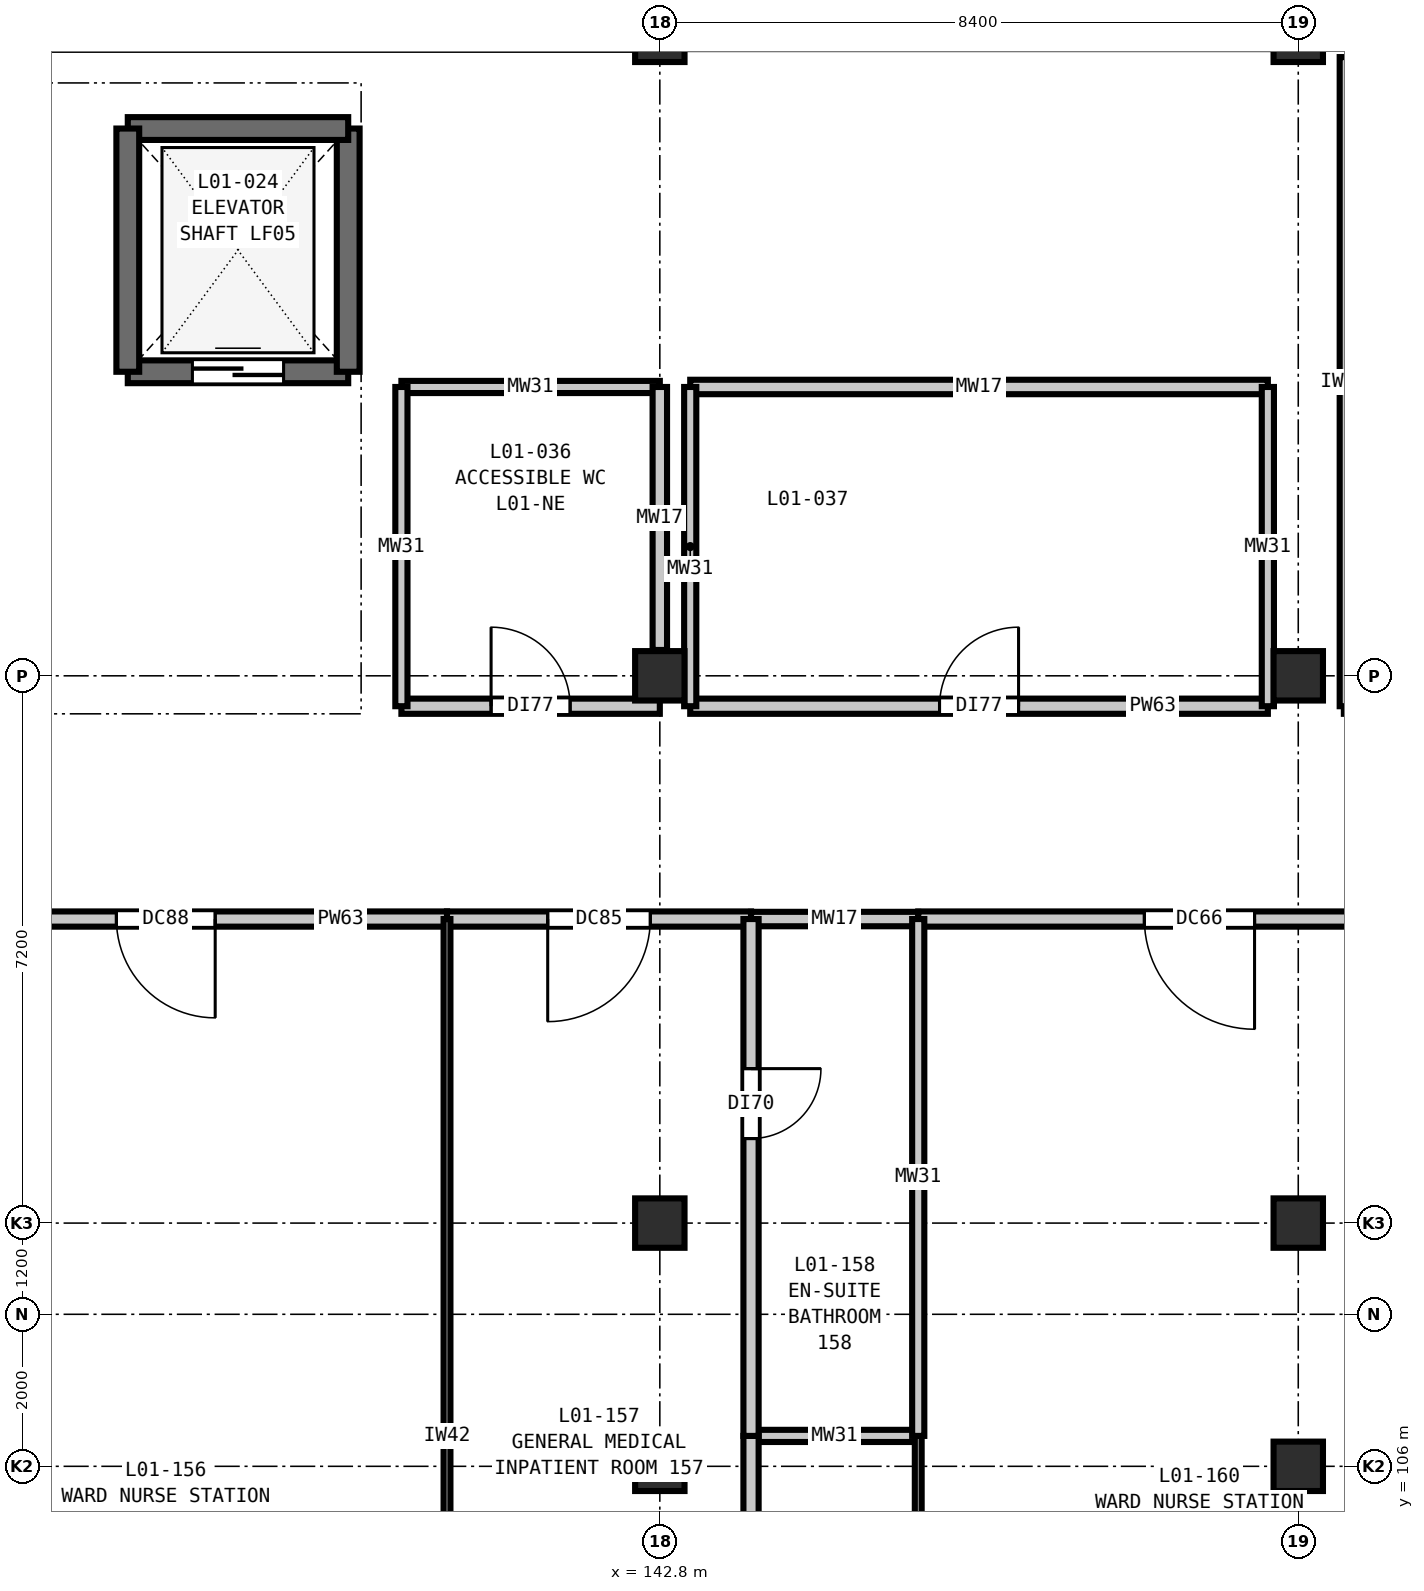
"""IFC4 building model, lengths in metres.
Left out: names, types, materials, properties, quantities, classifications, styles, units other than length and angle.
Written with IfcOpenShell. Run it as: python <this file> out.ifc"""

import sys

from ifc_helpers import new_model, si_unit, direction, frame, frame_2d, origin, origin_2d, place, context, subcontext, project, spatial, rectangle, extrude, element, fill, save


model = new_model("IFC4")
c1 = context("Model", 3, precision=1e-05, world=origin(), true_north=direction((0.0, 1.0)))
c2 = subcontext(c1, "Body", "Model", "MODEL_VIEW")
j1 = project(units=[si_unit("LENGTHUNIT", "METRE"), si_unit("PLANEANGLEUNIT", "RADIAN")], contexts=[c1])
p1 = place(None, origin())
s1 = spatial("IfcSite", under=j1, at=p1, CompositionType="ELEMENT")
p2 = place(p1, origin())
s2 = spatial("IfcBuilding", under=s1, at=p2, CompositionType="ELEMENT")
p3 = place(p2, frame((0.0, 0.0, 5.4)))
s3 = spatial("IfcBuildingStorey", under=s2, at=p3, CompositionType="ELEMENT", Elevation=5.4)
for number, where, z_axis, x_axis in (
    (1, (142.8, 106.0, 0.0), (0.0, 0.0, 1.0), (1.0, 0.0, 0.0)),
    (2, (142.8, 109.2, 0.0), (0.0, 0.0, 1.0), (1.0, 0.0, 0.0)),
    (3, (142.8, 116.4, 0.0), (0.0, 0.0, 1.0), (1.0, 0.0, 0.0)),
    (4, (142.8, 124.8, 0.0), (0.0, 0.0, 1.0), (1.0, 0.0, 0.0)),
    (5, (151.2, 106.0, 0.0), (0.0, 0.0, 1.0), (1.0, 0.0, 0.0)),
    (6, (151.2, 109.2, 0.0), (0.0, 0.0, 1.0), (1.0, 0.0, 0.0)),
    (7, (151.2, 116.4, 0.0), (0.0, 0.0, 1.0), (1.0, 0.0, 0.0)),
    (8, (151.2, 124.8, 0.0), (0.0, 0.0, 1.0), (1.0, 0.0, 0.0)),
):
    element("IfcColumn", number, at=place(p3, frame(where, z_axis=z_axis, x_axis=x_axis)), inside=s3, PredefinedType="COLUMN", context=c2, shape_type="SweptSolid", body=[
        extrude(rectangle(XDim=0.65, YDim=0.65, at=origin_2d()), origin(), (0.0, 0.0, 1.0), 5.4),
    ])
p4 = place(p3, frame((135.8, 120.4, 0.0), z_axis=(0.0, 0.0, 1.0), x_axis=(1.0, 0.0, 0.0)))
e9 = element("IfcWall", 9, at=p4, inside=s3, PredefinedType="SHEAR", context=c2, shape_type="SweptSolid", body=[
    extrude(rectangle(XDim=2.9, YDim=0.3, at=frame_2d((1.45, 0.0))), origin(), (0.0, 0.0, 1.0), 5.4),
])
p5 = place(p4, frame((0.85, 0.0, 0.0)))
e10 = element("IfcOpeningElement", 10, at=p5, cuts=e9, PredefinedType="OPENING", context=c2, shape_type="SweptSolid", body=[
    extrude(rectangle(XDim=1.2, YDim=2.2, at=frame_2d((0.6, 1.1))), frame((0.0, 0.16, 0.0), z_axis=(0.0, -1.0, 0.0), x_axis=(1.0, 0.0, 0.0)), (0.0, 0.0, 1.0), 0.32),
])
p6 = place(p3, frame((138.7, 120.4, 0.0), z_axis=(0.0, 0.0, 1.0), x_axis=(0.0, 1.0, 0.0)))
e11 = element("IfcWall", 11, at=p6, inside=s3, PredefinedType="SHEAR", context=c2, shape_type="SweptSolid", body=[
    extrude(rectangle(XDim=3.2, YDim=0.3, at=frame_2d((1.6, 0.0))), origin(), (0.0, 0.0, 1.0), 5.4),
])
p7 = place(p3, frame((138.7, 123.6, 0.0), z_axis=(0.0, 0.0, 1.0), x_axis=(-1.0, 0.0, 0.0)))
e12 = element("IfcWall", 12, at=p7, inside=s3, PredefinedType="SHEAR", context=c2, shape_type="SweptSolid", body=[
    extrude(rectangle(XDim=2.9, YDim=0.3, at=frame_2d((1.45, 0.0))), origin(), (0.0, 0.0, 1.0), 5.4),
])
p8 = place(p3, frame((135.8, 123.6, 0.0), z_axis=(0.0, 0.0, 1.0), x_axis=(0.0, -1.0, 0.0)))
e13 = element("IfcWall", 13, at=p8, inside=s3, PredefinedType="SHEAR", context=c2, shape_type="SweptSolid", body=[
    extrude(rectangle(XDim=3.2, YDim=0.3, at=frame_2d((1.6, 0.0))), origin(), (0.0, 0.0, 1.0), 5.4),
])
p9 = place(p3, frame((144.0, 106.4, 0.0), z_axis=(0.0, 0.0, 1.0), x_axis=(1.0, 0.0, 0.0)))
e14 = element("IfcWall", 14, at=p9, inside=s3, PredefinedType="PLUMBINGWALL", context=c2, shape_type="SweptSolid", body=[
    extrude(rectangle(XDim=2.2, YDim=0.16, at=frame_2d((1.1, 0.0))), origin(), (0.0, 0.0, 1.0), 5.05),
])
p10 = place(p3, frame((132.6, 113.2, 0.0), z_axis=(0.0, 0.0, 1.0), x_axis=(1.0, 0.0, 0.0)))
e15 = element("IfcWall", 15, at=p10, inside=s3, PredefinedType="PARTITIONING", context=c2, shape_type="SweptSolid", body=[
    extrude(rectangle(XDim=7.4, YDim=0.2, at=frame_2d((3.7, 0.0))), origin(), (0.0, 0.0, 1.0), 5.05),
])
p11 = place(p10, frame((3.05, 0.0, 0.0)))
e16 = element("IfcOpeningElement", 16, at=p11, cuts=e15, PredefinedType="OPENING", context=c2, shape_type="SweptSolid", body=[
    extrude(rectangle(XDim=1.3, YDim=2.2, at=frame_2d((0.65, 1.1))), frame((0.0, 0.11, 0.0), z_axis=(0.0, -1.0, 0.0), x_axis=(1.0, 0.0, 0.0)), (0.0, 0.0, 1.0), 0.22),
])
p12 = place(p3, frame((140.0, 113.2, 0.0), z_axis=(0.0, 0.0, 1.0), x_axis=(1.0, 0.0, 0.0)))
e17 = element("IfcWall", 17, at=p12, inside=s3, PredefinedType="PARTITIONING", context=c2, shape_type="SweptSolid", body=[
    extrude(rectangle(XDim=4.0, YDim=0.2, at=frame_2d((2.0, 0.0))), origin(), (0.0, 0.0, 1.0), 5.05),
])
p13 = place(p12, frame((1.325, 0.0, 0.0)))
e18 = element("IfcOpeningElement", 18, at=p13, cuts=e17, PredefinedType="OPENING", context=c2, shape_type="SweptSolid", body=[
    extrude(rectangle(XDim=1.35, YDim=2.2, at=frame_2d((0.675, 1.1))), frame((0.0, 0.11, 0.0), z_axis=(0.0, -1.0, 0.0), x_axis=(1.0, 0.0, 0.0)), (0.0, 0.0, 1.0), 0.22),
])
p14 = place(p3, frame((144.0, 113.2, 0.0), z_axis=(0.0, 0.0, 1.0), x_axis=(1.0, 0.0, 0.0)))
e19 = element("IfcWall", 19, at=p14, inside=s3, PredefinedType="PLUMBINGWALL", context=c2, shape_type="SweptSolid", body=[
    extrude(rectangle(XDim=2.2, YDim=0.19, at=frame_2d((1.1, 0.0))), origin(), (0.0, 0.0, 1.0), 5.05),
])
p15 = place(p3, frame((146.2, 113.2, 0.0), z_axis=(0.0, 0.0, 1.0), x_axis=(1.0, 0.0, 0.0)))
e20 = element("IfcWall", 20, at=p15, inside=s3, PredefinedType="PARTITIONING", context=c2, shape_type="SweptSolid", body=[
    extrude(rectangle(XDim=7.4, YDim=0.2, at=frame_2d((3.7, 0.0))), origin(), (0.0, 0.0, 1.0), 5.05),
])
p16 = place(p15, frame((2.975, 0.0, 0.0)))
e21 = element("IfcOpeningElement", 21, at=p16, cuts=e20, PredefinedType="OPENING", context=c2, shape_type="SweptSolid", body=[
    extrude(rectangle(XDim=1.45, YDim=2.25, at=frame_2d((0.725, 1.125))), frame((0.0, 0.11, 0.0), z_axis=(0.0, -1.0, 0.0), x_axis=(1.0, 0.0, 0.0)), (0.0, 0.0, 1.0), 0.22),
])
p17 = place(p3, frame((139.4, 116.0, 0.0), z_axis=(0.0, 0.0, 1.0), x_axis=(1.0, 0.0, 0.0)))
e22 = element("IfcWall", 22, at=p17, inside=s3, PredefinedType="PARTITIONING", context=c2, shape_type="SweptSolid", body=[
    extrude(rectangle(XDim=3.4, YDim=0.2, at=frame_2d((1.7, 0.0))), origin(), (0.0, 0.0, 1.0), 5.05),
])
p18 = place(p17, frame((1.18, 0.0, 0.0)))
e23 = element("IfcOpeningElement", 23, at=p18, cuts=e22, PredefinedType="OPENING", context=c2, shape_type="SweptSolid", body=[
    extrude(rectangle(XDim=1.04, YDim=2.1, at=frame_2d((0.52, 1.05))), frame((0.0, 0.11, 0.0), z_axis=(0.0, -1.0, 0.0), x_axis=(1.0, 0.0, 0.0)), (0.0, 0.0, 1.0), 0.22),
])
p19 = place(p3, frame((143.2, 116.0, 0.0), z_axis=(0.0, 0.0, 1.0), x_axis=(1.0, 0.0, 0.0)))
e24 = element("IfcWall", 24, at=p19, inside=s3, PredefinedType="PARTITIONING", context=c2, shape_type="SweptSolid", body=[
    extrude(rectangle(XDim=7.6, YDim=0.2, at=frame_2d((3.8, 0.0))), origin(), (0.0, 0.0, 1.0), 5.05),
])
p20 = place(p19, frame((3.28, 0.0, 0.0)))
e25 = element("IfcOpeningElement", 25, at=p20, cuts=e24, PredefinedType="OPENING", context=c2, shape_type="SweptSolid", body=[
    extrude(rectangle(XDim=1.04, YDim=2.1, at=frame_2d((0.52, 1.05))), frame((0.0, 0.11, 0.0), z_axis=(0.0, -1.0, 0.0), x_axis=(1.0, 0.0, 0.0)), (0.0, 0.0, 1.0), 0.22),
])
p21 = place(p3, frame((139.4, 120.2, 0.0), z_axis=(0.0, 0.0, 1.0), x_axis=(1.0, 0.0, 0.0)))
e26 = element("IfcWall", 26, at=p21, inside=s3, PredefinedType="PLUMBINGWALL", context=c2, shape_type="SweptSolid", body=[
    extrude(rectangle(XDim=3.4, YDim=0.16, at=frame_2d((1.7, 0.0))), origin(), (0.0, 0.0, 1.0), 5.05),
])
p22 = place(p3, frame((143.2, 120.2, 0.0), z_axis=(0.0, 0.0, 1.0), x_axis=(1.0, 0.0, 0.0)))
e27 = element("IfcWall", 27, at=p22, inside=s3, PredefinedType="PLUMBINGWALL", context=c2, shape_type="SweptSolid", body=[
    extrude(rectangle(XDim=7.6, YDim=0.19, at=frame_2d((3.8, 0.0))), origin(), (0.0, 0.0, 1.0), 5.05),
])
p23 = place(p3, frame((139.4, 116.0, 0.0), z_axis=(0.0, 0.0, 1.0), x_axis=(0.0, 1.0, 0.0)))
e28 = element("IfcWall", 28, at=p23, inside=s3, PredefinedType="PLUMBINGWALL", context=c2, shape_type="SweptSolid", body=[
    extrude(rectangle(XDim=4.2, YDim=0.16, at=frame_2d((2.1, 0.0))), origin(), (0.0, 0.0, 1.0), 5.05),
])
p24 = place(p3, frame((140.0, 99.6, 0.0), z_axis=(0.0, 0.0, 1.0), x_axis=(0.0, 1.0, 0.0)))
e29 = element("IfcWall", 29, at=p24, inside=s3, PredefinedType="PARTITIONING", context=c2, shape_type="SweptSolid", body=[
    extrude(rectangle(XDim=13.6, YDim=0.09, at=frame_2d((6.8, 0.0))), origin(), (0.0, 0.0, 1.0), 5.05),
])
p25 = place(p3, frame((142.8, 116.74, 0.0), z_axis=(0.0, 0.0, 1.0), x_axis=(0.0, 1.0, 0.0)))
e30 = element("IfcWall", 30, at=p25, inside=s3, PredefinedType="PLUMBINGWALL", context=c2, shape_type="SweptSolid", body=[
    extrude(rectangle(XDim=3.46, YDim=0.19, at=frame_2d((1.73, 0.0))), origin(), (0.0, 0.0, 1.0), 4.735),
])
p26 = place(p3, frame((143.2, 116.0, 0.0), z_axis=(0.0, 0.0, 1.0), x_axis=(0.0, 1.0, 0.0)))
e31 = element("IfcWall", 31, at=p26, inside=s3, PredefinedType="PLUMBINGWALL", context=c2, shape_type="SweptSolid", body=[
    extrude(rectangle(XDim=4.2, YDim=0.16, at=frame_2d((2.1, 0.0))), origin(), (0.0, 0.0, 1.0), 5.05),
])
p27 = place(p3, frame((144.0, 99.6, 0.0), z_axis=(0.0, 0.0, 1.0), x_axis=(0.0, 1.0, 0.0)))
e32 = element("IfcWall", 32, at=p27, inside=s3, PredefinedType="PARTITIONING", context=c2, shape_type="SweptSolid", body=[
    extrude(rectangle(XDim=6.8, YDim=0.2, at=frame_2d((3.4, 0.0))), origin(), (0.0, 0.0, 1.0), 5.05),
])
p28 = place(p27, frame((1.214, 0.0, 0.0)))
e33 = element("IfcOpeningElement", 33, at=p28, cuts=e32, PredefinedType="OPENING", context=c2, shape_type="SweptSolid", body=[
    extrude(rectangle(XDim=1.45, YDim=2.25, at=frame_2d((0.725, 1.125))), frame((0.0, 0.11, 0.0), z_axis=(0.0, -1.0, 0.0), x_axis=(1.0, 0.0, 0.0)), (0.0, 0.0, 1.0), 0.22),
])
p29 = place(p3, frame((144.0, 106.4, 0.0), z_axis=(0.0, 0.0, 1.0), x_axis=(0.0, 1.0, 0.0)))
e34 = element("IfcWall", 34, at=p29, inside=s3, PredefinedType="PARTITIONING", context=c2, shape_type="SweptSolid", body=[
    extrude(rectangle(XDim=6.8, YDim=0.2, at=frame_2d((3.4, 0.0))), origin(), (0.0, 0.0, 1.0), 5.05),
])
p30 = place(p29, frame((3.912, 0.0, 0.0)))
e35 = element("IfcOpeningElement", 35, at=p30, cuts=e34, PredefinedType="OPENING", context=c2, shape_type="SweptSolid", body=[
    extrude(rectangle(XDim=0.92, YDim=2.1, at=frame_2d((0.46, 1.05))), frame((0.0, 0.11, 0.0), z_axis=(0.0, -1.0, 0.0), x_axis=(1.0, 0.0, 0.0)), (0.0, 0.0, 1.0), 0.22),
])
p31 = place(p3, frame((146.2, 99.6, 0.0), z_axis=(0.0, 0.0, 1.0), x_axis=(0.0, 1.0, 0.0)))
e36 = element("IfcWall", 36, at=p31, inside=s3, PredefinedType="PARTITIONING", context=c2, shape_type="SweptSolid", body=[
    extrude(rectangle(XDim=6.8, YDim=0.09, at=frame_2d((3.4, 0.0))), origin(), (0.0, 0.0, 1.0), 5.05),
])
p32 = place(p3, frame((146.2, 106.4, 0.0), z_axis=(0.0, 0.0, 1.0), x_axis=(0.0, 1.0, 0.0)))
e37 = element("IfcWall", 37, at=p32, inside=s3, PredefinedType="PLUMBINGWALL", context=c2, shape_type="SweptSolid", body=[
    extrude(rectangle(XDim=6.8, YDim=0.16, at=frame_2d((3.4, 0.0))), origin(), (0.0, 0.0, 1.0), 5.05),
])
p33 = place(p3, frame((150.8, 116.0, 0.0), z_axis=(0.0, 0.0, 1.0), x_axis=(0.0, 1.0, 0.0)))
e38 = element("IfcWall", 38, at=p33, inside=s3, PredefinedType="PLUMBINGWALL", context=c2, shape_type="SweptSolid", body=[
    extrude(rectangle(XDim=4.2, YDim=0.16, at=frame_2d((2.1, 0.0))), origin(), (0.0, 0.0, 1.0), 5.05),
])
p34 = place(p3, frame((151.8, 116.0, 0.0), z_axis=(0.0, 0.0, 1.0), x_axis=(0.0, 1.0, 0.0)))
e39 = element("IfcWall", 39, at=p34, inside=s3, PredefinedType="PARTITIONING", context=c2, shape_type="SweptSolid", body=[
    extrude(rectangle(XDim=8.54, YDim=0.11, at=frame_2d((4.27, 0.0))), origin(), (0.0, 0.0, 1.0), 5.05),
])
p35 = place(p5, origin())
e40 = element("IfcDoor", 40, at=p35, inside=s3, OperationType="DOUBLE_DOOR_SLIDING", PredefinedType="DOOR", context=c2, shape_type="SweptSolid", body=[
    extrude(rectangle(XDim=1.2, YDim=2.2, at=frame_2d((0.6, 1.1))), frame((0.0, 0.025, 0.0), z_axis=(0.0, -1.0, 0.0), x_axis=(1.0, 0.0, 0.0)), (0.0, 0.0, 1.0), 0.05),
])
fill(e10, e40)
p36 = place(p11, frame((1.3, 0.0, 0.0), z_axis=(0.0, 0.0, 1.0), x_axis=(-1.0, 0.0, 0.0)))
e41 = element("IfcDoor", 41, at=p36, inside=s3, OperationType="SINGLE_SWING_LEFT", PredefinedType="DOOR", context=c2, shape_type="SweptSolid", body=[
    extrude(rectangle(XDim=1.3, YDim=2.2, at=frame_2d((0.65, 1.1))), frame((0.0, 0.025, 0.0), z_axis=(0.0, -1.0, 0.0), x_axis=(1.0, 0.0, 0.0)), (0.0, 0.0, 1.0), 0.05),
])
fill(e16, e41)
p37 = place(p13, frame((1.35, 0.0, 0.0), z_axis=(0.0, 0.0, 1.0), x_axis=(-1.0, 0.0, 0.0)))
e42 = element("IfcDoor", 42, at=p37, inside=s3, OperationType="SINGLE_SWING_RIGHT", PredefinedType="DOOR", context=c2, shape_type="SweptSolid", body=[
    extrude(rectangle(XDim=1.35, YDim=2.2, at=frame_2d((0.675, 1.1))), frame((0.0, 0.025, 0.0), z_axis=(0.0, -1.0, 0.0), x_axis=(1.0, 0.0, 0.0)), (0.0, 0.0, 1.0), 0.05),
])
fill(e18, e42)
p38 = place(p16, frame((1.45, 0.0, 0.0), z_axis=(0.0, 0.0, 1.0), x_axis=(-1.0, 0.0, 0.0)))
e43 = element("IfcDoor", 43, at=p38, inside=s3, OperationType="SINGLE_SWING_LEFT", PredefinedType="DOOR", context=c2, shape_type="SweptSolid", body=[
    extrude(rectangle(XDim=1.45, YDim=2.25, at=frame_2d((0.725, 1.125))), frame((0.0, 0.025, 0.0), z_axis=(0.0, -1.0, 0.0), x_axis=(1.0, 0.0, 0.0)), (0.0, 0.0, 1.0), 0.05),
])
fill(e21, e43)
p39 = place(p18, origin())
e44 = element("IfcDoor", 44, at=p39, inside=s3, OperationType="SINGLE_SWING_LEFT", PredefinedType="DOOR", context=c2, shape_type="SweptSolid", body=[
    extrude(rectangle(XDim=1.04, YDim=2.1, at=frame_2d((0.52, 1.05))), frame((0.0, 0.025, 0.0), z_axis=(0.0, -1.0, 0.0), x_axis=(1.0, 0.0, 0.0)), (0.0, 0.0, 1.0), 0.05),
])
fill(e23, e44)
p40 = place(p20, origin())
e45 = element("IfcDoor", 45, at=p40, inside=s3, OperationType="SINGLE_SWING_RIGHT", PredefinedType="DOOR", context=c2, shape_type="SweptSolid", body=[
    extrude(rectangle(XDim=1.04, YDim=2.1, at=frame_2d((0.52, 1.05))), frame((0.0, 0.025, 0.0), z_axis=(0.0, -1.0, 0.0), x_axis=(1.0, 0.0, 0.0)), (0.0, 0.0, 1.0), 0.05),
])
fill(e25, e45)
p41 = place(p30, frame((0.92, 0.0, 0.0), z_axis=(0.0, 0.0, 1.0), x_axis=(-1.0, 0.0, 0.0)))
e46 = element("IfcDoor", 46, at=p41, inside=s3, OperationType="SINGLE_SWING_LEFT", PredefinedType="DOOR", context=c2, shape_type="SweptSolid", body=[
    extrude(rectangle(XDim=0.92, YDim=2.1, at=frame_2d((0.46, 1.05))), frame((0.0, 0.025, 0.0), z_axis=(0.0, -1.0, 0.0), x_axis=(1.0, 0.0, 0.0)), (0.0, 0.0, 1.0), 0.05),
])
fill(e35, e46)
save(model, sys.argv[1])
